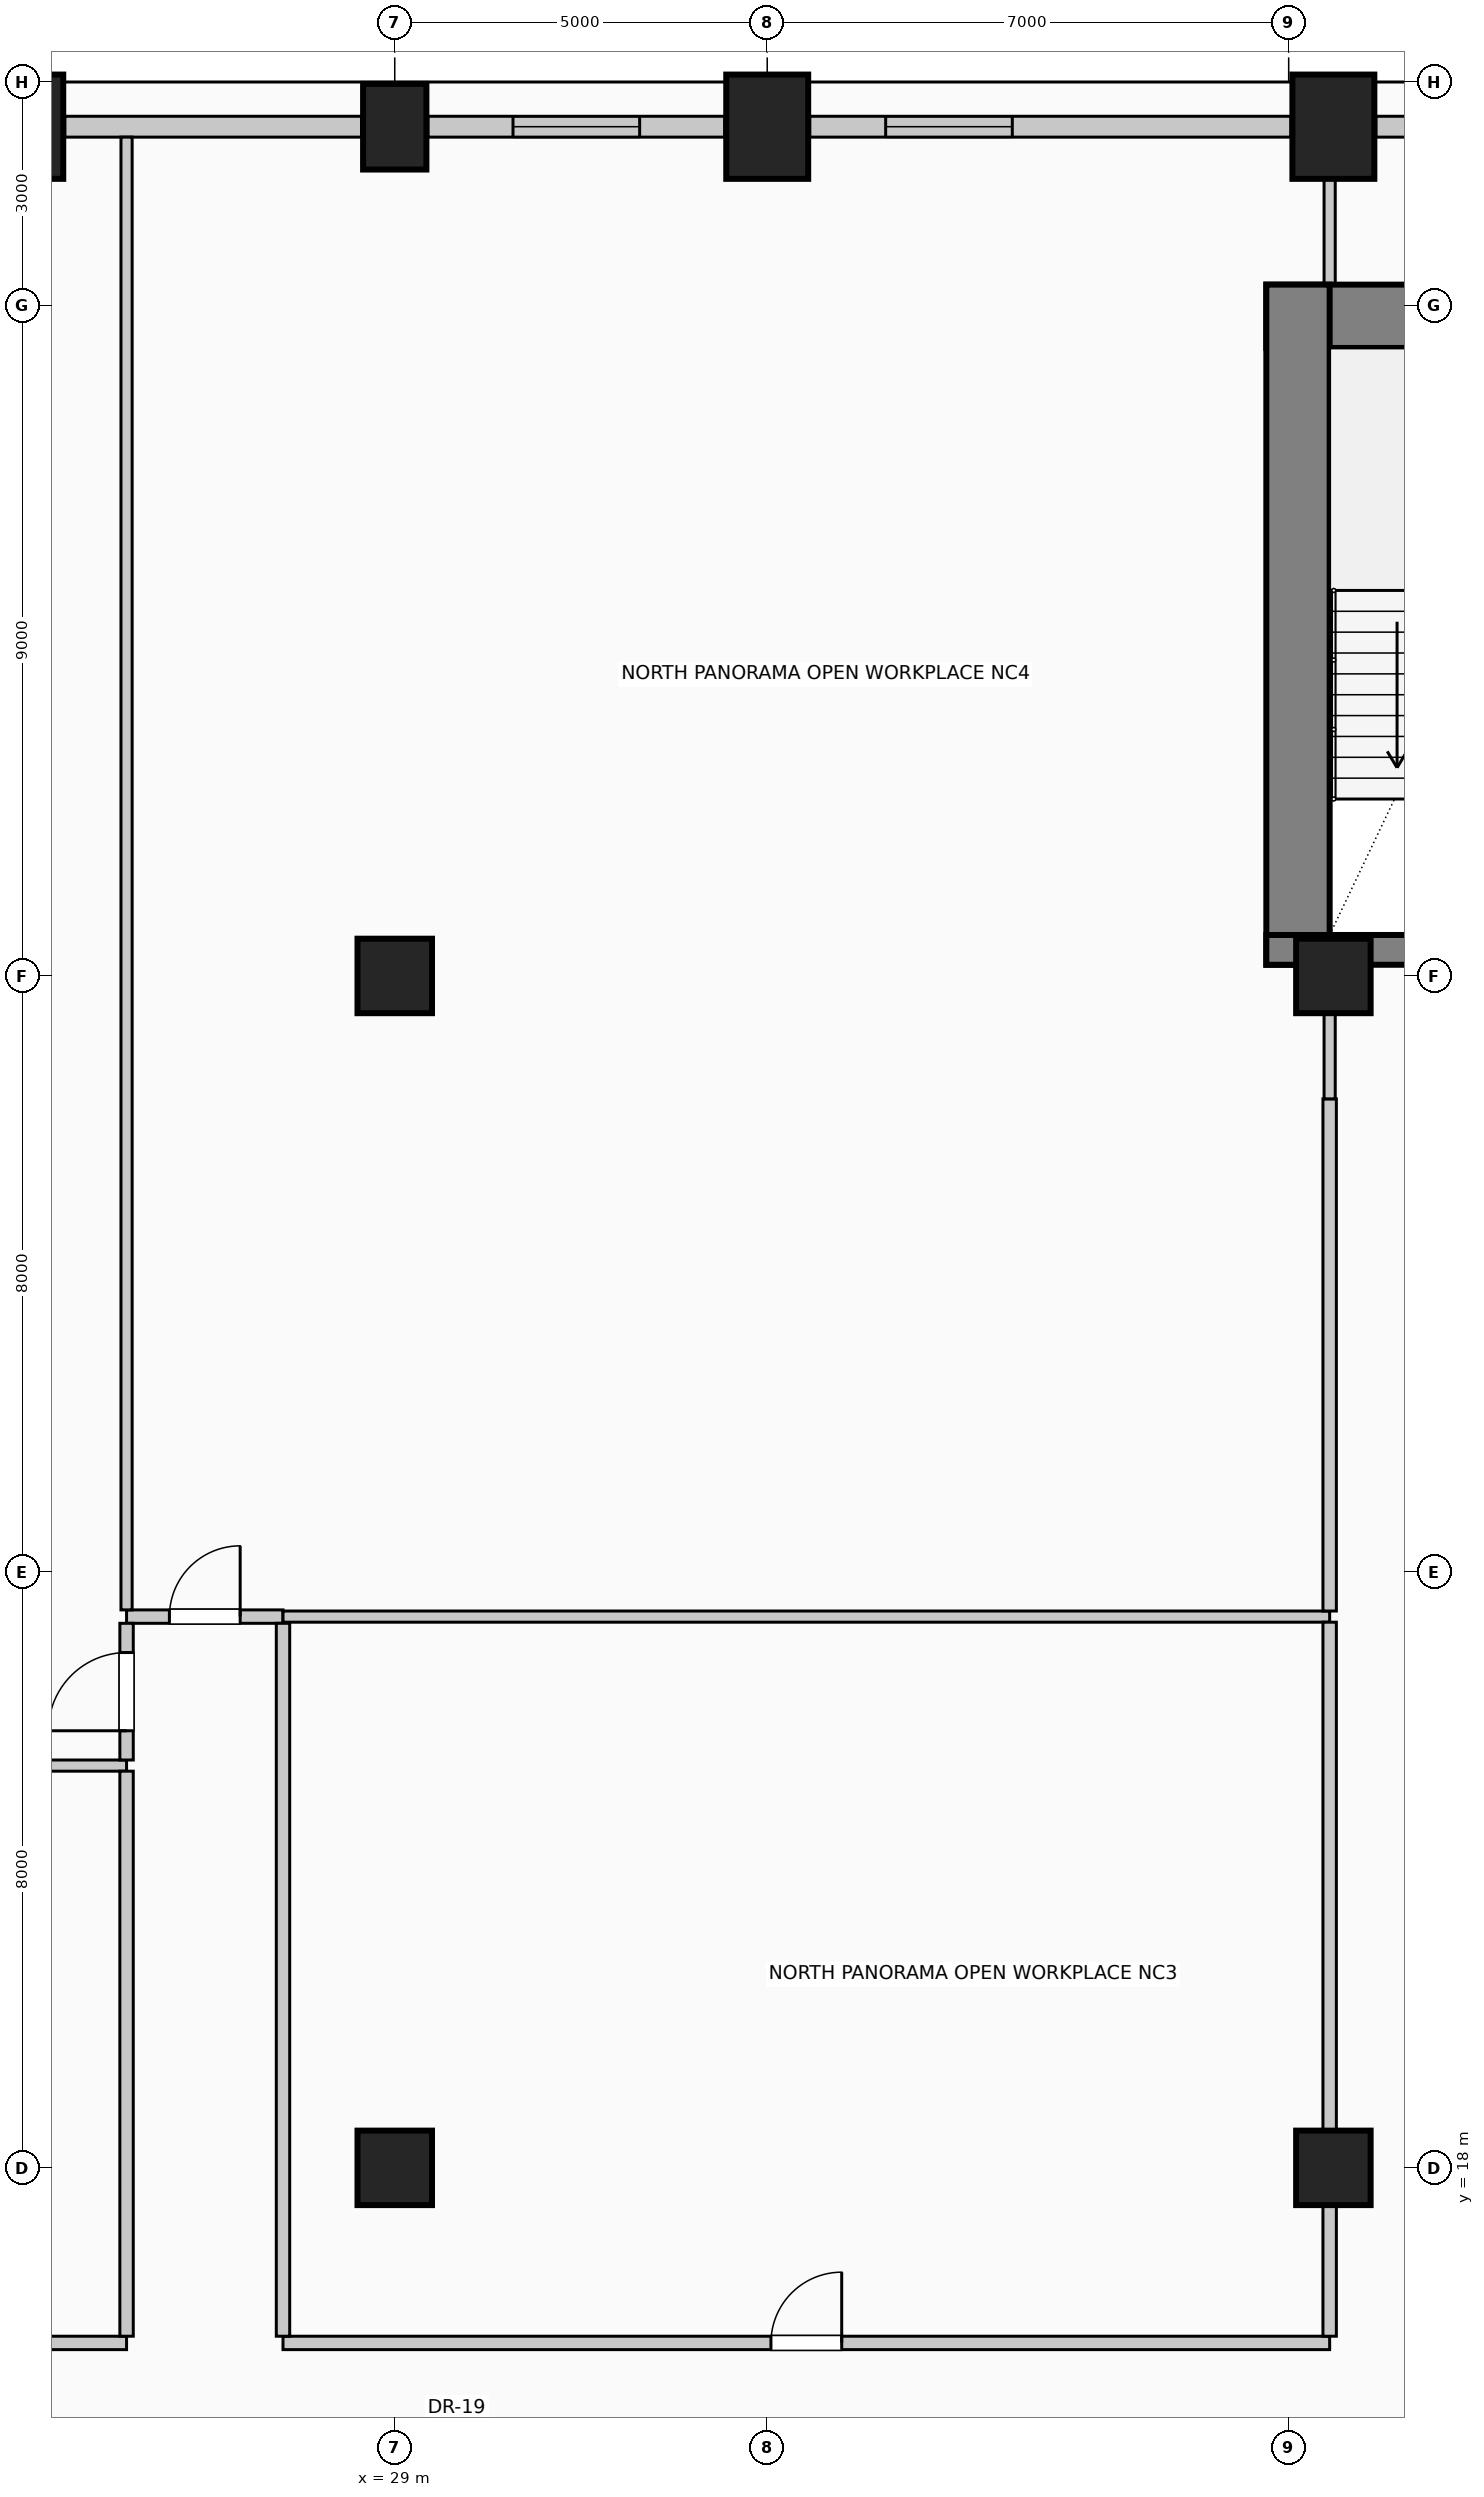
"""IFC4 building model, lengths in metres.
Left out: names, types, materials, properties, quantities, classifications, styles, units other than length and angle.
Written with IfcOpenShell. Run it as: python <this file> out.ifc"""

import sys

from ifc_helpers import new_model, si_unit, direction, frame, frame_2d, origin, origin_2d, place, context, subcontext, project, spatial, rectangle, circle, extrude, element, fill, save


model = new_model("IFC4")
c1 = context("Model", 3, precision=1e-05, world=origin(), true_north=direction((0.0, 1.0)))
c2 = subcontext(c1, "Body", "Model", "MODEL_VIEW")
j1 = project(units=[si_unit("LENGTHUNIT", "METRE"), si_unit("PLANEANGLEUNIT", "RADIAN")], contexts=[c1])
p1 = place(None, origin())
s1 = spatial("IfcSite", under=j1, at=p1, CompositionType="ELEMENT")
p2 = place(p1, origin())
s2 = spatial("IfcBuilding", under=s1, at=p2, CompositionType="ELEMENT")
p3 = place(p2, frame((0.0, 0.0, 112.6)))
s3 = spatial("IfcBuildingStorey", under=s2, at=p3, CompositionType="ELEMENT", Elevation=112.6)
p4 = place(p3, frame((40.7, 42.855, 0.0), z_axis=(0.0, 0.0, 1.0), x_axis=(1.0, 0.0, 0.0)))
e1 = element("IfcWall", 1, at=p4, inside=s3, PredefinedType="SHEAR", context=c2, shape_type="SweptSolid", body=[
    extrude(rectangle(XDim=14.6, YDim=0.85, at=frame_2d((7.3, 0.0))), origin(), (0.0, 0.0, 1.0), 4.0),
])
p5 = place(p3, frame((41.125, 34.15, 0.0), z_axis=(0.0, 0.0, 1.0), x_axis=(0.0, 1.0, 0.0)))
e2 = element("IfcWall", 2, at=p5, inside=s3, PredefinedType="SHEAR", context=c2, shape_type="SweptSolid", body=[
    extrude(rectangle(XDim=9.13, YDim=0.85, at=frame_2d((4.565, 0.0))), origin(), (0.0, 0.0, 1.0), 4.0),
])
p6 = place(p3, frame((40.7, 34.35, 0.0), z_axis=(0.0, 0.0, 1.0), x_axis=(1.0, 0.0, 0.0)))
e3 = element("IfcWall", 3, at=p6, inside=s3, PredefinedType="SHEAR", context=c2, shape_type="SweptSolid", body=[
    extrude(rectangle(XDim=5.01, YDim=0.4, at=frame_2d((2.505, 0.0))), origin(), (0.0, 0.0, 1.0), 4.0),
])
p7 = place(p6, frame((2.4, 0.0, 0.0)))
e4 = element("IfcOpeningElement", 4, at=p7, cuts=e3, PredefinedType="OPENING", context=c2, shape_type="SweptSolid", body=[
    extrude(rectangle(XDim=1.15, YDim=2.2, at=frame_2d((0.575, 1.1))), frame((0.0, 0.21, 0.0), z_axis=(0.0, -1.0, 0.0), x_axis=(1.0, 0.0, 0.0)), (0.0, 0.0, 1.0), 0.42),
])
p8 = place(p3, frame((24.0, 45.4, 0.0), z_axis=(0.0, 0.0, 1.0), x_axis=(1.0, 0.0, 0.0)))
e5 = element("IfcColumn", 5, at=p8, inside=s3, PredefinedType="COLUMN", context=c2, shape_type="SweptSolid", body=[
    extrude(rectangle(XDim=1.1, YDim=1.4, at=origin_2d()), origin(), (0.0, 0.0, 1.0), 4.0),
])
p9 = place(p3, frame((29.0, 45.4, 0.0), z_axis=(0.0, 0.0, 1.0), x_axis=(1.0, 0.0, 0.0)))
e6 = element("IfcColumn", 6, at=p9, inside=s3, PredefinedType="COLUMN", context=c2, shape_type="SweptSolid", body=[
    extrude(rectangle(XDim=0.85, YDim=1.15, at=origin_2d()), origin(), (0.0, 0.0, 1.0), 4.0),
])
for number, where, z_axis, x_axis in (
    (7, (34.0, 45.4, 0.0), (0.0, 0.0, 1.0), (1.0, 0.0, 0.0)),
    (8, (41.6, 45.4, 0.0), (0.0, 0.0, 1.0), (1.0, 0.0, 0.0)),
):
    element("IfcColumn", number, at=place(p3, frame(where, z_axis=z_axis, x_axis=x_axis)), inside=s3, PredefinedType="COLUMN", context=c2, shape_type="SweptSolid", body=[
        extrude(rectangle(XDim=1.1, YDim=1.4, at=origin_2d()), origin(), (0.0, 0.0, 1.0), 4.0),
    ])
for number, where, z_axis, x_axis in (
    (9, (29.0, 18.0, 0.0), (0.0, 0.0, 1.0), (1.0, 0.0, 0.0)),
    (10, (29.0, 34.0, 0.0), (0.0, 0.0, 1.0), (1.0, 0.0, 0.0)),
    (11, (41.6, 18.0, 0.0), (0.0, 0.0, 1.0), (1.0, 0.0, 0.0)),
    (12, (41.6, 34.0, 0.0), (0.0, 0.0, 1.0), (1.0, 0.0, 0.0)),
):
    element("IfcColumn", number, at=place(p3, frame(where, z_axis=z_axis, x_axis=x_axis)), inside=s3, PredefinedType="COLUMN", context=c2, shape_type="SweptSolid", body=[
        extrude(circle(Radius=0.5, at=origin_2d()), origin(), (0.0, 0.0, 1.0), 4.0),
    ])
p10 = place(p3, frame((24.57, 45.4, 0.0), z_axis=(0.0, 0.0, 1.0), x_axis=(1.0, 0.0, 0.0)))
e13 = element("IfcWall", 13, at=p10, inside=s3, PredefinedType="SOLIDWALL", context=c2, shape_type="SweptSolid", body=[
    extrude(rectangle(XDim=3.985, YDim=0.28, at=frame_2d((1.992, 0.0))), origin(), (0.0, 0.0, 1.0), 2.875),
])
p11 = place(p3, frame((29.445, 45.4, 0.0), z_axis=(0.0, 0.0, 1.0), x_axis=(1.0, 0.0, 0.0)))
e14 = element("IfcWall", 14, at=p11, inside=s3, PredefinedType="SOLIDWALL", context=c2, shape_type="SweptSolid", body=[
    extrude(rectangle(XDim=3.985, YDim=0.28, at=frame_2d((1.992, 0.0))), origin(), (0.0, 0.0, 1.0), 2.875),
])
p12 = place(p11, frame((1.143, 0.0, 0.5)))
e15 = element("IfcOpeningElement", 15, at=p12, cuts=e14, PredefinedType="OPENING", context=c2, shape_type="SweptSolid", body=[
    extrude(rectangle(XDim=1.7, YDim=1.95, at=frame_2d((0.85, 0.975))), frame((0.0, 0.15, 0.0), z_axis=(0.0, -1.0, 0.0), x_axis=(1.0, 0.0, 0.0)), (0.0, 0.0, 1.0), 0.3),
])
p13 = place(p3, frame((34.57, 45.4, 0.0), z_axis=(0.0, 0.0, 1.0), x_axis=(1.0, 0.0, 0.0)))
e16 = element("IfcWall", 16, at=p13, inside=s3, PredefinedType="SOLIDWALL", context=c2, shape_type="SweptSolid", body=[
    extrude(rectangle(XDim=6.46, YDim=0.28, at=frame_2d((3.23, 0.0))), origin(), (0.0, 0.0, 1.0), 2.875),
])
p14 = place(p13, frame((1.02, 0.0, 0.5)))
e17 = element("IfcOpeningElement", 17, at=p14, cuts=e16, PredefinedType="OPENING", context=c2, shape_type="SweptSolid", body=[
    extrude(rectangle(XDim=1.7, YDim=1.95, at=frame_2d((0.85, 0.975))), frame((0.0, 0.15, 0.0), z_axis=(0.0, -1.0, 0.0), x_axis=(1.0, 0.0, 0.0)), (0.0, 0.0, 1.0), 0.3),
])
p15 = place(p3, frame((42.17, 45.4, 0.0), z_axis=(0.0, 0.0, 1.0), x_axis=(1.0, 0.0, 0.0)))
e18 = element("IfcWall", 18, at=p15, inside=s3, PredefinedType="SOLIDWALL", context=c2, shape_type="SweptSolid", body=[
    extrude(rectangle(XDim=1.385, YDim=0.28, at=frame_2d((0.692, 0.0))), origin(), (0.0, 0.0, 1.0), 2.875),
])
p16 = place(p3, frame((16.65, 15.65, 0.0), z_axis=(0.0, 0.0, 1.0), x_axis=(1.0, 0.0, 0.0)))
e19 = element("IfcWall", 19, at=p16, inside=s3, PredefinedType="PARTITIONING", context=c2, shape_type="SweptSolid", body=[
    extrude(rectangle(XDim=8.75, YDim=0.18, at=frame_2d((4.375, 0.0))), origin(), (0.0, 0.0, 1.0), 3.725),
])
p17 = place(p16, frame((3.85, 0.0, 0.0)))
e20 = element("IfcOpeningElement", 20, at=p17, cuts=e19, PredefinedType="OPENING", context=c2, shape_type="SweptSolid", body=[
    extrude(rectangle(XDim=1.05, YDim=2.15, at=frame_2d((0.525, 1.075))), frame((0.0, 0.1, 0.0), z_axis=(0.0, -1.0, 0.0), x_axis=(1.0, 0.0, 0.0)), (0.0, 0.0, 1.0), 0.2),
])
p18 = place(p3, frame((27.5, 15.65, 0.0), z_axis=(0.0, 0.0, 1.0), x_axis=(1.0, 0.0, 0.0)))
e21 = element("IfcWall", 21, at=p18, inside=s3, PredefinedType="PARTITIONING", context=c2, shape_type="SweptSolid", body=[
    extrude(rectangle(XDim=14.05, YDim=0.18, at=frame_2d((7.025, 0.0))), origin(), (0.0, 0.0, 1.0), 3.725),
])
p19 = place(p18, frame((6.55, 0.0, 0.0)))
e22 = element("IfcOpeningElement", 22, at=p19, cuts=e21, PredefinedType="OPENING", context=c2, shape_type="SweptSolid", body=[
    extrude(rectangle(XDim=0.95, YDim=2.15, at=frame_2d((0.475, 1.075))), frame((0.0, 0.1, 0.0), z_axis=(0.0, -1.0, 0.0), x_axis=(1.0, 0.0, 0.0)), (0.0, 0.0, 1.0), 0.2),
])
p20 = place(p3, frame((16.65, 23.4, 0.0), z_axis=(0.0, 0.0, 1.0), x_axis=(1.0, 0.0, 0.0)))
e23 = element("IfcWall", 23, at=p20, inside=s3, PredefinedType="PARTITIONING", context=c2, shape_type="SweptSolid", body=[
    extrude(rectangle(XDim=8.75, YDim=0.15, at=frame_2d((4.375, 0.0))), origin(), (0.0, 0.0, 1.0), 3.725),
])
p21 = place(p3, frame((25.4, 25.4, 0.0), z_axis=(0.0, 0.0, 1.0), x_axis=(1.0, 0.0, 0.0)))
e24 = element("IfcWall", 24, at=p21, inside=s3, PredefinedType="PARTITIONING", context=c2, shape_type="SweptSolid", body=[
    extrude(rectangle(XDim=2.1, YDim=0.18, at=frame_2d((1.05, 0.0))), origin(), (0.0, 0.0, 1.0), 3.17),
])
p22 = place(p21, frame((0.575, 0.0, 0.0)))
e25 = element("IfcOpeningElement", 25, at=p22, cuts=e24, PredefinedType="OPENING", context=c2, shape_type="SweptSolid", body=[
    extrude(rectangle(XDim=0.95, YDim=2.15, at=frame_2d((0.475, 1.075))), frame((0.0, 0.1, 0.0), z_axis=(0.0, -1.0, 0.0), x_axis=(1.0, 0.0, 0.0)), (0.0, 0.0, 1.0), 0.2),
])
p23 = place(p3, frame((27.5, 25.4, 0.0), z_axis=(0.0, 0.0, 1.0), x_axis=(1.0, 0.0, 0.0)))
e26 = element("IfcWall", 26, at=p23, inside=s3, PredefinedType="PARTITIONING", context=c2, shape_type="SweptSolid", body=[
    extrude(rectangle(XDim=14.05, YDim=0.15, at=frame_2d((7.025, 0.0))), origin(), (0.0, 0.0, 1.0), 3.17),
])
p24 = place(p3, frame((25.4, 15.74, 0.0), z_axis=(0.0, 0.0, 1.0), x_axis=(0.0, 1.0, 0.0)))
e27 = element("IfcWall", 27, at=p24, inside=s3, PredefinedType="PARTITIONING", context=c2, shape_type="SweptSolid", body=[
    extrude(rectangle(XDim=7.585, YDim=0.18, at=frame_2d((3.792, 0.0))), origin(), (0.0, 0.0, 1.0), 3.725),
])
p25 = place(p3, frame((25.4, 23.475, 0.0), z_axis=(0.0, 0.0, 1.0), x_axis=(0.0, 1.0, 0.0)))
e28 = element("IfcWall", 28, at=p25, inside=s3, PredefinedType="PARTITIONING", context=c2, shape_type="SweptSolid", body=[
    extrude(rectangle(XDim=1.835, YDim=0.18, at=frame_2d((0.917, 0.0))), origin(), (0.0, 0.0, 1.0), 3.725),
])
p26 = place(p25, frame((0.393, 0.0, 0.0)))
e29 = element("IfcOpeningElement", 29, at=p26, cuts=e28, PredefinedType="OPENING", context=c2, shape_type="SweptSolid", body=[
    extrude(rectangle(XDim=1.05, YDim=2.15, at=frame_2d((0.525, 1.075))), frame((0.0, 0.1, 0.0), z_axis=(0.0, -1.0, 0.0), x_axis=(1.0, 0.0, 0.0)), (0.0, 0.0, 1.0), 0.2),
])
p27 = place(p3, frame((25.4, 25.49, 0.0), z_axis=(0.0, 0.0, 1.0), x_axis=(0.0, 1.0, 0.0)))
e30 = element("IfcWall", 30, at=p27, inside=s3, PredefinedType="PARTITIONING", context=c2, shape_type="SweptSolid", body=[
    extrude(rectangle(XDim=19.77, YDim=0.15, at=frame_2d((9.885, 0.0))), origin(), (0.0, 0.0, 1.0), 3.725),
])
p28 = place(p3, frame((27.5, 15.74, 0.0), z_axis=(0.0, 0.0, 1.0), x_axis=(0.0, 1.0, 0.0)))
e31 = element("IfcWall", 31, at=p28, inside=s3, PredefinedType="PARTITIONING", context=c2, shape_type="SweptSolid", body=[
    extrude(rectangle(XDim=9.57, YDim=0.18, at=frame_2d((4.785, 0.0))), origin(), (0.0, 0.0, 1.0), 3.725),
])
p29 = place(p3, frame((41.55, 15.74, 0.0), z_axis=(0.0, 0.0, 1.0), x_axis=(0.0, 1.0, 0.0)))
e32 = element("IfcWall", 32, at=p29, inside=s3, PredefinedType="PARTITIONING", context=c2, shape_type="SweptSolid", body=[
    extrude(rectangle(XDim=1.76, YDim=0.18, at=frame_2d((0.88, 0.0))), origin(), (0.0, 0.0, 1.0), 3.07),
])
p30 = place(p3, frame((41.55, 18.5, 0.0), z_axis=(0.0, 0.0, 1.0), x_axis=(0.0, 1.0, 0.0)))
e33 = element("IfcWall", 33, at=p30, inside=s3, PredefinedType="PARTITIONING", context=c2, shape_type="SweptSolid", body=[
    extrude(rectangle(XDim=6.825, YDim=0.18, at=frame_2d((3.413, 0.0))), origin(), (0.0, 0.0, 1.0), 3.07),
])
p31 = place(p3, frame((41.55, 25.475, 0.0), z_axis=(0.0, 0.0, 1.0), x_axis=(0.0, 1.0, 0.0)))
e34 = element("IfcWall", 34, at=p31, inside=s3, PredefinedType="PARTITIONING", context=c2, shape_type="SweptSolid", body=[
    extrude(rectangle(XDim=6.875, YDim=0.18, at=frame_2d((3.438, 0.0))), origin(), (0.0, 0.0, 1.0), 3.07),
])
p32 = place(p3, frame((41.55, 32.35, 0.0), z_axis=(0.0, 0.0, 1.0), x_axis=(0.0, 1.0, 0.0)))
e35 = element("IfcWall", 35, at=p32, inside=s3, PredefinedType="PARTITIONING", context=c2, shape_type="SweptSolid", body=[
    extrude(rectangle(XDim=1.15, YDim=0.15, at=frame_2d((0.575, 0.0))), origin(), (0.0, 0.0, 1.0), 3.07),
])
p33 = place(p3, frame((41.55, 43.28, 0.0), z_axis=(0.0, 0.0, 1.0), x_axis=(0.0, 1.0, 0.0)))
e36 = element("IfcWall", 36, at=p33, inside=s3, PredefinedType="PARTITIONING", context=c2, shape_type="SweptSolid", body=[
    extrude(rectangle(XDim=1.42, YDim=0.15, at=frame_2d((0.71, 0.0))), origin(), (0.0, 0.0, 1.0), 3.725),
])
p34 = place(p12, origin())
e37 = element("IfcWindow", 37, at=p34, inside=s3, PartitioningType="SINGLE_PANEL", PredefinedType="WINDOW", context=c2, shape_type="SweptSolid", body=[
    extrude(rectangle(XDim=1.7, YDim=1.95, at=frame_2d((0.85, 0.975))), frame((0.0, 0.03, 0.0), z_axis=(0.0, -1.0, 0.0), x_axis=(1.0, 0.0, 0.0)), (0.0, 0.0, 1.0), 0.06),
])
fill(e15, e37)
p35 = place(p14, origin())
e38 = element("IfcWindow", 38, at=p35, inside=s3, PartitioningType="SINGLE_PANEL", PredefinedType="WINDOW", context=c2, shape_type="SweptSolid", body=[
    extrude(rectangle(XDim=1.7, YDim=1.95, at=frame_2d((0.85, 0.975))), frame((0.0, 0.03, 0.0), z_axis=(0.0, -1.0, 0.0), x_axis=(1.0, 0.0, 0.0)), (0.0, 0.0, 1.0), 0.06),
])
fill(e17, e38)
p36 = place(p19, origin())
e39 = element("IfcDoor", 39, at=p36, inside=s3, OperationType="SINGLE_SWING_RIGHT", PredefinedType="DOOR", context=c2, shape_type="SweptSolid", body=[
    extrude(rectangle(XDim=0.95, YDim=2.15, at=frame_2d((0.475, 1.075))), frame((0.0, 0.025, 0.0), z_axis=(0.0, -1.0, 0.0), x_axis=(1.0, 0.0, 0.0)), (0.0, 0.0, 1.0), 0.05),
])
fill(e22, e39)
p37 = place(p22, origin())
e40 = element("IfcDoor", 40, at=p37, inside=s3, OperationType="SINGLE_SWING_RIGHT", PredefinedType="DOOR", context=c2, shape_type="SweptSolid", body=[
    extrude(rectangle(XDim=0.95, YDim=2.15, at=frame_2d((0.475, 1.075))), frame((0.0, 0.025, 0.0), z_axis=(0.0, -1.0, 0.0), x_axis=(1.0, 0.0, 0.0)), (0.0, 0.0, 1.0), 0.05),
])
fill(e25, e40)
p38 = place(p26, origin())
e41 = element("IfcDoor", 41, at=p38, inside=s3, OperationType="SINGLE_SWING_LEFT", PredefinedType="DOOR", context=c2, shape_type="SweptSolid", body=[
    extrude(rectangle(XDim=1.05, YDim=2.15, at=frame_2d((0.525, 1.075))), frame((0.0, 0.025, 0.0), z_axis=(0.0, -1.0, 0.0), x_axis=(1.0, 0.0, 0.0)), (0.0, 0.0, 1.0), 0.05),
])
fill(e29, e41)
save(model, sys.argv[1])
